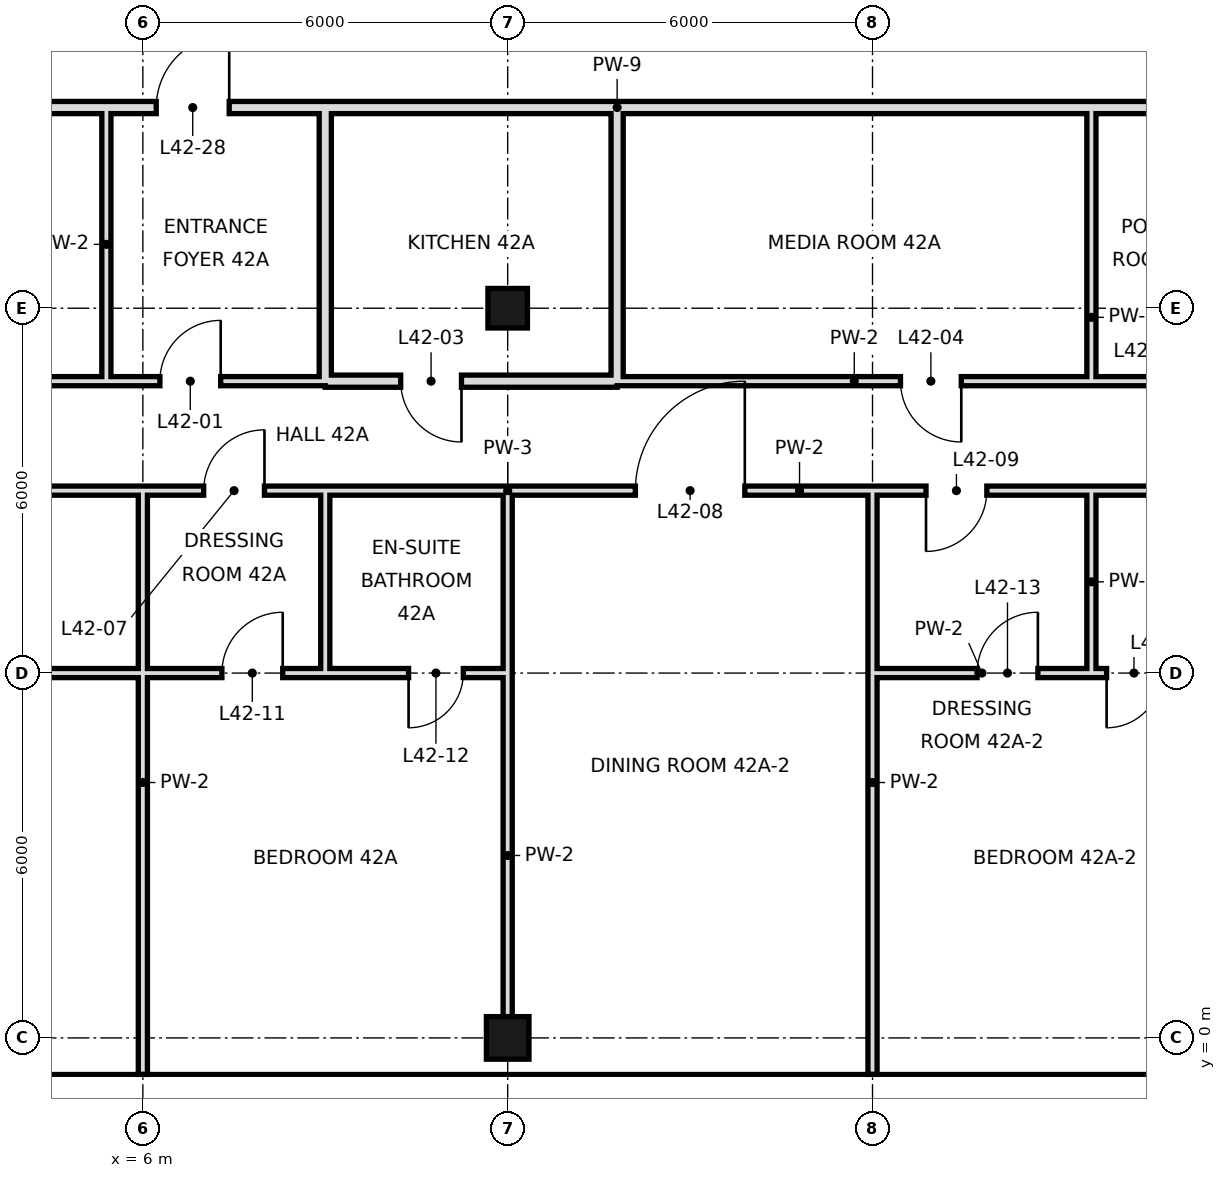
"""IFC4 building model, lengths in metres.
Left out: names, types, materials, properties, quantities, classifications, styles, units other than length and angle.
Written with IfcOpenShell. Run it as: python <this file> out.ifc"""

import sys

from ifc_helpers import new_model, si_unit, direction, frame, frame_2d, origin, origin_2d, place, context, subcontext, project, spatial, rectangle, hollow_rectangle, extrude, element, fill, save


model = new_model("IFC4")
c1 = context("Model", 3, precision=1e-05, world=origin(), true_north=direction((0.0, 1.0)))
c2 = subcontext(c1, "Body", "Model", "MODEL_VIEW")
j1 = project(units=[si_unit("LENGTHUNIT", "METRE"), si_unit("PLANEANGLEUNIT", "RADIAN")], contexts=[c1])
p1 = place(None, origin())
s1 = spatial("IfcSite", under=j1, at=p1, CompositionType="ELEMENT")
p2 = place(p1, origin())
s2 = spatial("IfcBuilding", under=s1, at=p2, CompositionType="ELEMENT")
p3 = place(p2, frame((0.0, 0.0, 181.6)))
s3 = spatial("IfcBuildingStorey", under=s2, at=p3, CompositionType="ELEMENT", Elevation=181.6)
p4 = place(p3, frame((12.0, 0.0, 0.0), z_axis=(0.0, 0.0, 1.0), x_axis=(1.0, 0.0, 0.0)))
e1 = element("IfcColumn", 1, at=p4, inside=s3, PredefinedType="COLUMN", context=c2, shape_type="SweptSolid", body=[
    extrude(hollow_rectangle(XDim=0.7, YDim=0.7, WallThickness=0.036, at=origin_2d()), origin(), (0.0, 0.0, 1.0), 4.4),
])
p5 = place(p3, frame((12.0, 12.0, 0.0), z_axis=(0.0, 0.0, 1.0), x_axis=(1.0, 0.0, 0.0)))
e2 = element("IfcColumn", 2, at=p5, inside=s3, PredefinedType="COLUMN", context=c2, shape_type="SweptSolid", body=[
    extrude(hollow_rectangle(XDim=0.65, YDim=0.65, WallThickness=0.032, at=origin_2d()), origin(), (0.0, 0.0, 1.0), 4.4),
])
p6 = place(p3, frame((12.0, 0.0, 0.0), z_axis=(0.0, 0.0, 1.0), x_axis=(0.0, 1.0, 0.0)))
e3 = element("IfcWall", 3, at=p6, inside=s3, PredefinedType="PARTITIONING", context=c2, shape_type="SweptSolid", body=[
    extrude(rectangle(XDim=6.0, YDim=0.15, at=frame_2d((3.0, 0.0))), origin(), (0.0, 0.0, 1.0), 3.4),
])
p7 = place(p3, frame((12.0, 6.0, 0.0), z_axis=(0.0, 0.0, 1.0), x_axis=(0.0, 1.0, 0.0)))
e4 = element("IfcWall", 4, at=p7, inside=s3, PredefinedType="PARTITIONING", context=c2, shape_type="SweptSolid", body=[
    extrude(rectangle(XDim=3.0, YDim=0.15, at=frame_2d((1.5, 0.0))), origin(), (0.0, 0.0, 1.0), 3.4),
])
p8 = place(p3, frame((13.8, 10.8, 0.0), z_axis=(0.0, 0.0, 1.0), x_axis=(0.0, 1.0, 0.0)))
e5 = element("IfcWall", 5, at=p8, inside=s3, PredefinedType="SOLIDWALL", context=c2, shape_type="SweptSolid", body=[
    extrude(rectangle(XDim=4.5, YDim=0.2, at=frame_2d((2.25, 0.0))), origin(), (0.0, 0.0, 1.0), 3.4),
])
p9 = place(p3, frame((18.0, -0.6, 0.0), z_axis=(0.0, 0.0, 1.0), x_axis=(0.0, 1.0, 0.0)))
e6 = element("IfcWall", 6, at=p9, inside=s3, PredefinedType="PARTITIONING", context=c2, shape_type="SweptSolid", body=[
    extrude(rectangle(XDim=9.6, YDim=0.15, at=frame_2d((4.8, 0.0))), origin(), (0.0, 0.0, 1.0), 3.4),
])
p10 = place(p3, frame((21.6, 6.0, 0.0), z_axis=(0.0, 0.0, 1.0), x_axis=(0.0, 1.0, 0.0)))
e7 = element("IfcWall", 7, at=p10, inside=s3, PredefinedType="PARTITIONING", context=c2, shape_type="SweptSolid", body=[
    extrude(rectangle(XDim=3.0, YDim=0.15, at=frame_2d((1.5, 0.0))), origin(), (0.0, 0.0, 1.0), 4.1),
])
for number, where, z_axis, x_axis in (
    (8, (21.6, 10.8, 0.0), (0.0, 0.0, 1.0), (0.0, 1.0, 0.0)),
    (9, (5.4, 10.8, 0.0), (0.0, 0.0, 1.0), (0.0, 1.0, 0.0)),
):
    element("IfcWall", number, at=place(p3, frame(where, z_axis=z_axis, x_axis=x_axis)), inside=s3, PredefinedType="PARTITIONING", context=c2, shape_type="SweptSolid", body=[
        extrude(rectangle(XDim=4.5, YDim=0.15, at=frame_2d((2.25, 0.0))), origin(), (0.0, 0.0, 1.0), 4.1),
    ])
p11 = place(p3, frame((6.0, -0.6, 0.0), z_axis=(0.0, 0.0, 1.0), x_axis=(0.0, 1.0, 0.0)))
e10 = element("IfcWall", 10, at=p11, inside=s3, PredefinedType="PARTITIONING", context=c2, shape_type="SweptSolid", body=[
    extrude(rectangle(XDim=9.6, YDim=0.15, at=frame_2d((4.8, 0.0))), origin(), (0.0, 0.0, 1.0), 3.4),
])
p12 = place(p3, frame((9.0, 10.8, 0.0), z_axis=(0.0, 0.0, 1.0), x_axis=(0.0, 1.0, 0.0)))
e11 = element("IfcWall", 11, at=p12, inside=s3, PredefinedType="SOLIDWALL", context=c2, shape_type="SweptSolid", body=[
    extrude(rectangle(XDim=4.5, YDim=0.2, at=frame_2d((2.25, 0.0))), origin(), (0.0, 0.0, 1.0), 3.4),
])
p13 = place(p3, frame((9.0, 6.0, 0.0), z_axis=(0.0, 0.0, 1.0), x_axis=(0.0, 1.0, 0.0)))
e12 = element("IfcWall", 12, at=p13, inside=s3, PredefinedType="PARTITIONING", context=c2, shape_type="SweptSolid", body=[
    extrude(rectangle(XDim=3.0, YDim=0.15, at=frame_2d((1.5, 0.0))), origin(), (0.0, 0.0, 1.0), 4.1),
])
p14 = place(p3, frame((9.0, 10.8, 0.0), z_axis=(0.0, 0.0, 1.0), x_axis=(1.0, 0.0, 0.0)))
e13 = element("IfcWall", 13, at=p14, inside=s3, PredefinedType="SOLIDWALL", context=c2, shape_type="SweptSolid", body=[
    extrude(rectangle(XDim=4.8, YDim=0.2, at=frame_2d((2.4, 0.0))), origin(), (0.0, 0.0, 1.0), 3.4),
])
p15 = place(p14, frame((1.24, 0.0, 0.0)))
e14 = element("IfcOpeningElement", 14, at=p15, cuts=e13, PredefinedType="OPENING", context=c2, shape_type="SweptSolid", body=[
    extrude(rectangle(XDim=1.0, YDim=2.4, at=frame_2d((0.5, 1.2))), frame((0.0, 0.11, 0.0), z_axis=(0.0, -1.0, 0.0), x_axis=(1.0, 0.0, 0.0)), (0.0, 0.0, 1.0), 0.22),
])
p16 = place(p3, frame((-6.6, 10.8, 0.0), z_axis=(0.0, 0.0, 1.0), x_axis=(1.0, 0.0, 0.0)))
e15 = element("IfcWall", 15, at=p16, inside=s3, PredefinedType="PARTITIONING", context=c2, shape_type="SweptSolid", body=[
    extrude(rectangle(XDim=15.6, YDim=0.15, at=frame_2d((7.8, 0.0))), origin(), (0.0, 0.0, 1.0), 4.1),
])
p17 = place(p16, frame((12.88, 0.0, 0.0)))
e16 = element("IfcOpeningElement", 16, at=p17, cuts=e15, PredefinedType="OPENING", context=c2, shape_type="SweptSolid", body=[
    extrude(rectangle(XDim=1.0, YDim=2.4, at=frame_2d((0.5, 1.2))), frame((0.0, 0.085, 0.0), z_axis=(0.0, -1.0, 0.0), x_axis=(1.0, 0.0, 0.0)), (0.0, 0.0, 1.0), 0.17),
])
p18 = place(p16, frame((3.82, 0.0, 0.0)))
e17 = element("IfcOpeningElement", 17, at=p18, cuts=e15, PredefinedType="OPENING", context=c2, shape_type="SweptSolid", body=[
    extrude(rectangle(XDim=1.0, YDim=2.4, at=frame_2d((0.5, 1.2))), frame((0.0, 0.085, 0.0), z_axis=(0.0, -1.0, 0.0), x_axis=(1.0, 0.0, 0.0)), (0.0, 0.0, 1.0), 0.17),
])
p19 = place(p3, frame((13.8, 10.8, 0.0), z_axis=(0.0, 0.0, 1.0), x_axis=(1.0, 0.0, 0.0)))
e18 = element("IfcWall", 18, at=p19, inside=s3, PredefinedType="PARTITIONING", context=c2, shape_type="SweptSolid", body=[
    extrude(rectangle(XDim=7.8, YDim=0.15, at=frame_2d((3.9, 0.0))), origin(), (0.0, 0.0, 1.0), 4.1),
])
p20 = place(p19, frame((4.66, 0.0, 0.0)))
e19 = element("IfcOpeningElement", 19, at=p20, cuts=e18, PredefinedType="OPENING", context=c2, shape_type="SweptSolid", body=[
    extrude(rectangle(XDim=1.0, YDim=2.4, at=frame_2d((0.5, 1.2))), frame((0.0, 0.085, 0.0), z_axis=(0.0, -1.0, 0.0), x_axis=(1.0, 0.0, 0.0)), (0.0, 0.0, 1.0), 0.17),
])
p21 = place(p3, frame((21.6, 10.8, 0.0), z_axis=(0.0, 0.0, 1.0), x_axis=(1.0, 0.0, 0.0)))
e20 = element("IfcWall", 20, at=p21, inside=s3, PredefinedType="PARTITIONING", context=c2, shape_type="SweptSolid", body=[
    extrude(rectangle(XDim=2.4, YDim=0.15, at=frame_2d((1.2, 0.0))), origin(), (0.0, 0.0, 1.0), 4.1),
])
p22 = place(p21, frame((0.95, 0.0, 0.0)))
e21 = element("IfcOpeningElement", 21, at=p22, cuts=e20, PredefinedType="OPENING", context=c2, shape_type="SweptSolid", body=[
    extrude(rectangle(XDim=0.9, YDim=2.4, at=frame_2d((0.45, 1.2))), frame((0.0, 0.085, 0.0), z_axis=(0.0, -1.0, 0.0), x_axis=(1.0, 0.0, 0.0)), (0.0, 0.0, 1.0), 0.17),
])
p23 = place(p3, frame((3.1, 15.3, 0.0), z_axis=(0.0, 0.0, 1.0), x_axis=(1.0, 0.0, 0.0)))
e22 = element("IfcWall", 22, at=p23, inside=s3, PredefinedType="SOLIDWALL", context=c2, shape_type="SweptSolid", body=[
    extrude(rectangle(XDim=5.9, YDim=0.2, at=frame_2d((2.95, 0.0))), origin(), (0.0, 0.0, 1.0), 3.4),
])
p24 = place(p23, frame((3.12, 0.0, 0.0)))
e23 = element("IfcOpeningElement", 23, at=p24, cuts=e22, PredefinedType="OPENING", context=c2, shape_type="SweptSolid", body=[
    extrude(rectangle(XDim=1.2, YDim=2.4, at=frame_2d((0.6, 1.2))), frame((0.0, 0.11, 0.0), z_axis=(0.0, -1.0, 0.0), x_axis=(1.0, 0.0, 0.0)), (0.0, 0.0, 1.0), 0.22),
])
p25 = place(p3, frame((13.8, 15.3, 0.0), z_axis=(0.0, 0.0, 1.0), x_axis=(1.0, 0.0, 0.0)))
e24 = element("IfcWall", 24, at=p25, inside=s3, PredefinedType="SOLIDWALL", context=c2, shape_type="SweptSolid", body=[
    extrude(rectangle(XDim=31.1, YDim=0.2, at=frame_2d((15.55, 0.0))), origin(), (0.0, 0.0, 1.0), 3.4),
])
p26 = place(p25, frame((11.02, 0.0, 0.0)))
e25 = element("IfcOpeningElement", 25, at=p26, cuts=e24, PredefinedType="OPENING", context=c2, shape_type="SweptSolid", body=[
    extrude(rectangle(XDim=1.2, YDim=2.4, at=frame_2d((0.6, 1.2))), frame((0.0, 0.11, 0.0), z_axis=(0.0, -1.0, 0.0), x_axis=(1.0, 0.0, 0.0)), (0.0, 0.0, 1.0), 0.22),
])
p27 = place(p3, frame((9.0, 15.3, 0.0), z_axis=(0.0, 0.0, 1.0), x_axis=(1.0, 0.0, 0.0)))
e26 = element("IfcWall", 26, at=p27, inside=s3, PredefinedType="SOLIDWALL", context=c2, shape_type="SweptSolid", body=[
    extrude(rectangle(XDim=4.8, YDim=0.2, at=frame_2d((2.4, 0.0))), origin(), (0.0, 0.0, 1.0), 4.1),
])
p28 = place(p3, frame((-6.0, 6.0, 0.0), z_axis=(0.0, 0.0, 1.0), x_axis=(1.0, 0.0, 0.0)))
e27 = element("IfcWall", 27, at=p28, inside=s3, PredefinedType="PARTITIONING", context=c2, shape_type="SweptSolid", body=[
    extrude(rectangle(XDim=15.0, YDim=0.15, at=frame_2d((7.5, 0.0))), origin(), (0.0, 0.0, 1.0), 3.65),
])
p29 = place(p28, frame((7.04, 0.0, 0.0)))
e28 = element("IfcOpeningElement", 28, at=p29, cuts=e27, PredefinedType="OPENING", context=c2, shape_type="SweptSolid", body=[
    extrude(rectangle(XDim=1.8, YDim=2.4, at=frame_2d((0.9, 1.2))), frame((0.0, 0.085, 0.0), z_axis=(0.0, -1.0, 0.0), x_axis=(1.0, 0.0, 0.0)), (0.0, 0.0, 1.0), 0.17),
])
p30 = place(p28, frame((13.3, 0.0, 0.0)))
e29 = element("IfcOpeningElement", 29, at=p30, cuts=e27, PredefinedType="OPENING", context=c2, shape_type="SweptSolid", body=[
    extrude(rectangle(XDim=1.0, YDim=2.4, at=frame_2d((0.5, 1.2))), frame((0.0, 0.085, 0.0), z_axis=(0.0, -1.0, 0.0), x_axis=(1.0, 0.0, 0.0)), (0.0, 0.0, 1.0), 0.17),
])
p31 = place(p3, frame((18.0, 6.0, 0.0), z_axis=(0.0, 0.0, 1.0), x_axis=(1.0, 0.0, 0.0)))
e30 = element("IfcWall", 30, at=p31, inside=s3, PredefinedType="PARTITIONING", context=c2, shape_type="SweptSolid", body=[
    extrude(rectangle(XDim=3.6, YDim=0.15, at=frame_2d((1.8, 0.0))), origin(), (0.0, 0.0, 1.0), 3.65),
])
p32 = place(p31, frame((1.72, 0.0, 0.0)))
e31 = element("IfcOpeningElement", 31, at=p32, cuts=e30, PredefinedType="OPENING", context=c2, shape_type="SweptSolid", body=[
    extrude(rectangle(XDim=1.0, YDim=2.4, at=frame_2d((0.5, 1.2))), frame((0.0, 0.085, 0.0), z_axis=(0.0, -1.0, 0.0), x_axis=(1.0, 0.0, 0.0)), (0.0, 0.0, 1.0), 0.17),
])
p33 = place(p3, frame((9.0, 6.0, 0.0), z_axis=(0.0, 0.0, 1.0), x_axis=(1.0, 0.0, 0.0)))
e32 = element("IfcWall", 32, at=p33, inside=s3, PredefinedType="PARTITIONING", context=c2, shape_type="SweptSolid", body=[
    extrude(rectangle(XDim=3.0, YDim=0.15, at=frame_2d((1.5, 0.0))), origin(), (0.0, 0.0, 1.0), 3.65),
])
p34 = place(p33, frame((1.37, 0.0, 0.0)))
e33 = element("IfcOpeningElement", 33, at=p34, cuts=e32, PredefinedType="OPENING", context=c2, shape_type="SweptSolid", body=[
    extrude(rectangle(XDim=0.9, YDim=2.4, at=frame_2d((0.45, 1.2))), frame((0.0, 0.085, 0.0), z_axis=(0.0, -1.0, 0.0), x_axis=(1.0, 0.0, 0.0)), (0.0, 0.0, 1.0), 0.17),
])
p35 = place(p3, frame((21.6, 6.0, 0.0), z_axis=(0.0, 0.0, 1.0), x_axis=(1.0, 0.0, 0.0)))
e34 = element("IfcWall", 34, at=p35, inside=s3, PredefinedType="PARTITIONING", context=c2, shape_type="SweptSolid", body=[
    extrude(rectangle(XDim=2.4, YDim=0.15, at=frame_2d((1.2, 0.0))), origin(), (0.0, 0.0, 1.0), 3.65),
])
p36 = place(p35, frame((0.25, 0.0, 0.0)))
e35 = element("IfcOpeningElement", 35, at=p36, cuts=e34, PredefinedType="OPENING", context=c2, shape_type="SweptSolid", body=[
    extrude(rectangle(XDim=0.9, YDim=2.4, at=frame_2d((0.45, 1.2))), frame((0.0, 0.085, 0.0), z_axis=(0.0, -1.0, 0.0), x_axis=(1.0, 0.0, 0.0)), (0.0, 0.0, 1.0), 0.17),
])
p37 = place(p3, frame((-6.6, 9.0, 0.0), z_axis=(0.0, 0.0, 1.0), x_axis=(1.0, 0.0, 0.0)))
e36 = element("IfcWall", 36, at=p37, inside=s3, PredefinedType="PARTITIONING", context=c2, shape_type="SweptSolid", body=[
    extrude(rectangle(XDim=15.6, YDim=0.15, at=frame_2d((7.8, 0.0))), origin(), (0.0, 0.0, 1.0), 4.1),
])
p38 = place(p37, frame((3.76, 0.0, 0.0)))
e37 = element("IfcOpeningElement", 37, at=p38, cuts=e36, PredefinedType="OPENING", context=c2, shape_type="SweptSolid", body=[
    extrude(rectangle(XDim=1.8, YDim=2.4, at=frame_2d((0.9, 1.2))), frame((0.0, 0.085, 0.0), z_axis=(0.0, -1.0, 0.0), x_axis=(1.0, 0.0, 0.0)), (0.0, 0.0, 1.0), 0.17),
])
p39 = place(p37, frame((13.6, 0.0, 0.0)))
e38 = element("IfcOpeningElement", 38, at=p39, cuts=e36, PredefinedType="OPENING", context=c2, shape_type="SweptSolid", body=[
    extrude(rectangle(XDim=1.0, YDim=2.4, at=frame_2d((0.5, 1.2))), frame((0.0, 0.085, 0.0), z_axis=(0.0, -1.0, 0.0), x_axis=(1.0, 0.0, 0.0)), (0.0, 0.0, 1.0), 0.17),
])
p40 = place(p3, frame((12.0, 9.0, 0.0), z_axis=(0.0, 0.0, 1.0), x_axis=(1.0, 0.0, 0.0)))
e39 = element("IfcWall", 39, at=p40, inside=s3, PredefinedType="PARTITIONING", context=c2, shape_type="SweptSolid", body=[
    extrude(rectangle(XDim=9.6, YDim=0.15, at=frame_2d((4.8, 0.0))), origin(), (0.0, 0.0, 1.0), 4.1),
])
p41 = place(p40, frame((2.1, 0.0, 0.0)))
e40 = element("IfcOpeningElement", 40, at=p41, cuts=e39, PredefinedType="OPENING", context=c2, shape_type="SweptSolid", body=[
    extrude(rectangle(XDim=1.8, YDim=2.4, at=frame_2d((0.9, 1.2))), frame((0.0, 0.085, 0.0), z_axis=(0.0, -1.0, 0.0), x_axis=(1.0, 0.0, 0.0)), (0.0, 0.0, 1.0), 0.17),
])
p42 = place(p40, frame((6.88, 0.0, 0.0)))
e41 = element("IfcOpeningElement", 41, at=p42, cuts=e39, PredefinedType="OPENING", context=c2, shape_type="SweptSolid", body=[
    extrude(rectangle(XDim=1.0, YDim=2.4, at=frame_2d((0.5, 1.2))), frame((0.0, 0.085, 0.0), z_axis=(0.0, -1.0, 0.0), x_axis=(1.0, 0.0, 0.0)), (0.0, 0.0, 1.0), 0.17),
])
p43 = place(p3, frame((9.0, 9.0, 0.0), z_axis=(0.0, 0.0, 1.0), x_axis=(1.0, 0.0, 0.0)))
e42 = element("IfcWall", 42, at=p43, inside=s3, PredefinedType="PARTITIONING", context=c2, shape_type="SweptSolid", body=[
    extrude(rectangle(XDim=3.0, YDim=0.15, at=frame_2d((1.5, 0.0))), origin(), (0.0, 0.0, 1.0), 4.1),
])
p44 = place(p3, frame((21.6, 9.0, 0.0), z_axis=(0.0, 0.0, 1.0), x_axis=(1.0, 0.0, 0.0)))
e43 = element("IfcWall", 43, at=p44, inside=s3, PredefinedType="PARTITIONING", context=c2, shape_type="SweptSolid", body=[
    extrude(rectangle(XDim=2.4, YDim=0.15, at=frame_2d((1.2, 0.0))), origin(), (0.0, 0.0, 1.0), 4.1),
])
p45 = place(p17, frame((1.0, 0.0, 0.0), z_axis=(0.0, 0.0, 1.0), x_axis=(-1.0, 0.0, 0.0)))
e44 = element("IfcDoor", 44, at=p45, inside=s3, OperationType="SINGLE_SWING_LEFT", PredefinedType="DOOR", context=c2, shape_type="SweptSolid", body=[
    extrude(rectangle(XDim=1.0, YDim=2.4, at=frame_2d((0.5, 1.2))), frame((0.0, 0.025, 0.0), z_axis=(0.0, -1.0, 0.0), x_axis=(1.0, 0.0, 0.0)), (0.0, 0.0, 1.0), 0.05),
])
fill(e16, e44)
p46 = place(p15, origin())
e45 = element("IfcDoor", 45, at=p46, inside=s3, OperationType="SINGLE_SWING_RIGHT", PredefinedType="DOOR", context=c2, shape_type="SweptSolid", body=[
    extrude(rectangle(XDim=1.0, YDim=2.4, at=frame_2d((0.5, 1.2))), frame((0.0, 0.025, 0.0), z_axis=(0.0, -1.0, 0.0), x_axis=(1.0, 0.0, 0.0)), (0.0, 0.0, 1.0), 0.05),
])
fill(e14, e45)
p47 = place(p20, origin())
e46 = element("IfcDoor", 46, at=p47, inside=s3, OperationType="SINGLE_SWING_RIGHT", PredefinedType="DOOR", context=c2, shape_type="SweptSolid", body=[
    extrude(rectangle(XDim=1.0, YDim=2.4, at=frame_2d((0.5, 1.2))), frame((0.0, 0.025, 0.0), z_axis=(0.0, -1.0, 0.0), x_axis=(1.0, 0.0, 0.0)), (0.0, 0.0, 1.0), 0.05),
])
fill(e19, e46)
p48 = place(p39, frame((1.0, 0.0, 0.0), z_axis=(0.0, 0.0, 1.0), x_axis=(-1.0, 0.0, 0.0)))
e47 = element("IfcDoor", 47, at=p48, inside=s3, OperationType="SINGLE_SWING_LEFT", PredefinedType="DOOR", context=c2, shape_type="SweptSolid", body=[
    extrude(rectangle(XDim=1.0, YDim=2.4, at=frame_2d((0.5, 1.2))), frame((0.0, 0.025, 0.0), z_axis=(0.0, -1.0, 0.0), x_axis=(1.0, 0.0, 0.0)), (0.0, 0.0, 1.0), 0.05),
])
fill(e38, e47)
p49 = place(p41, frame((1.8, 0.0, 0.0), z_axis=(0.0, 0.0, 1.0), x_axis=(-1.0, 0.0, 0.0)))
e48 = element("IfcDoor", 48, at=p49, inside=s3, OperationType="SINGLE_SWING_LEFT", PredefinedType="DOOR", context=c2, shape_type="SweptSolid", body=[
    extrude(rectangle(XDim=1.8, YDim=2.4, at=frame_2d((0.9, 1.2))), frame((0.0, 0.025, 0.0), z_axis=(0.0, -1.0, 0.0), x_axis=(1.0, 0.0, 0.0)), (0.0, 0.0, 1.0), 0.05),
])
fill(e40, e48)
p50 = place(p42, frame((1.0, 0.0, 0.0), z_axis=(0.0, 0.0, 1.0), x_axis=(-1.0, 0.0, 0.0)))
e49 = element("IfcDoor", 49, at=p50, inside=s3, OperationType="SINGLE_SWING_RIGHT", PredefinedType="DOOR", context=c2, shape_type="SweptSolid", body=[
    extrude(rectangle(XDim=1.0, YDim=2.4, at=frame_2d((0.5, 1.2))), frame((0.0, 0.025, 0.0), z_axis=(0.0, -1.0, 0.0), x_axis=(1.0, 0.0, 0.0)), (0.0, 0.0, 1.0), 0.05),
])
fill(e41, e49)
p51 = place(p30, frame((1.0, 0.0, 0.0), z_axis=(0.0, 0.0, 1.0), x_axis=(-1.0, 0.0, 0.0)))
e50 = element("IfcDoor", 50, at=p51, inside=s3, OperationType="SINGLE_SWING_LEFT", PredefinedType="DOOR", context=c2, shape_type="SweptSolid", body=[
    extrude(rectangle(XDim=1.0, YDim=2.4, at=frame_2d((0.5, 1.2))), frame((0.0, 0.025, 0.0), z_axis=(0.0, -1.0, 0.0), x_axis=(1.0, 0.0, 0.0)), (0.0, 0.0, 1.0), 0.05),
])
fill(e29, e50)
p52 = place(p34, frame((0.9, 0.0, 0.0), z_axis=(0.0, 0.0, 1.0), x_axis=(-1.0, 0.0, 0.0)))
e51 = element("IfcDoor", 51, at=p52, inside=s3, OperationType="SINGLE_SWING_RIGHT", PredefinedType="DOOR", context=c2, shape_type="SweptSolid", body=[
    extrude(rectangle(XDim=0.9, YDim=2.4, at=frame_2d((0.45, 1.2))), frame((0.0, 0.025, 0.0), z_axis=(0.0, -1.0, 0.0), x_axis=(1.0, 0.0, 0.0)), (0.0, 0.0, 1.0), 0.05),
])
fill(e33, e51)
p53 = place(p32, frame((1.0, 0.0, 0.0), z_axis=(0.0, 0.0, 1.0), x_axis=(-1.0, 0.0, 0.0)))
e52 = element("IfcDoor", 52, at=p53, inside=s3, OperationType="SINGLE_SWING_LEFT", PredefinedType="DOOR", context=c2, shape_type="SweptSolid", body=[
    extrude(rectangle(XDim=1.0, YDim=2.4, at=frame_2d((0.5, 1.2))), frame((0.0, 0.025, 0.0), z_axis=(0.0, -1.0, 0.0), x_axis=(1.0, 0.0, 0.0)), (0.0, 0.0, 1.0), 0.05),
])
fill(e31, e52)
p54 = place(p36, frame((0.9, 0.0, 0.0), z_axis=(0.0, 0.0, 1.0), x_axis=(-1.0, 0.0, 0.0)))
e53 = element("IfcDoor", 53, at=p54, inside=s3, OperationType="SINGLE_SWING_RIGHT", PredefinedType="DOOR", context=c2, shape_type="SweptSolid", body=[
    extrude(rectangle(XDim=0.9, YDim=2.4, at=frame_2d((0.45, 1.2))), frame((0.0, 0.025, 0.0), z_axis=(0.0, -1.0, 0.0), x_axis=(1.0, 0.0, 0.0)), (0.0, 0.0, 1.0), 0.05),
])
fill(e35, e53)
p55 = place(p24, frame((1.2, 0.0, 0.0), z_axis=(0.0, 0.0, 1.0), x_axis=(-1.0, 0.0, 0.0)))
e54 = element("IfcDoor", 54, at=p55, inside=s3, OperationType="SINGLE_SWING_LEFT", PredefinedType="DOOR", context=c2, shape_type="SweptSolid", body=[
    extrude(rectangle(XDim=1.2, YDim=2.4, at=frame_2d((0.6, 1.2))), frame((0.0, 0.025, 0.0), z_axis=(0.0, -1.0, 0.0), x_axis=(1.0, 0.0, 0.0)), (0.0, 0.0, 1.0), 0.05),
])
fill(e23, e54)
save(model, sys.argv[1])
